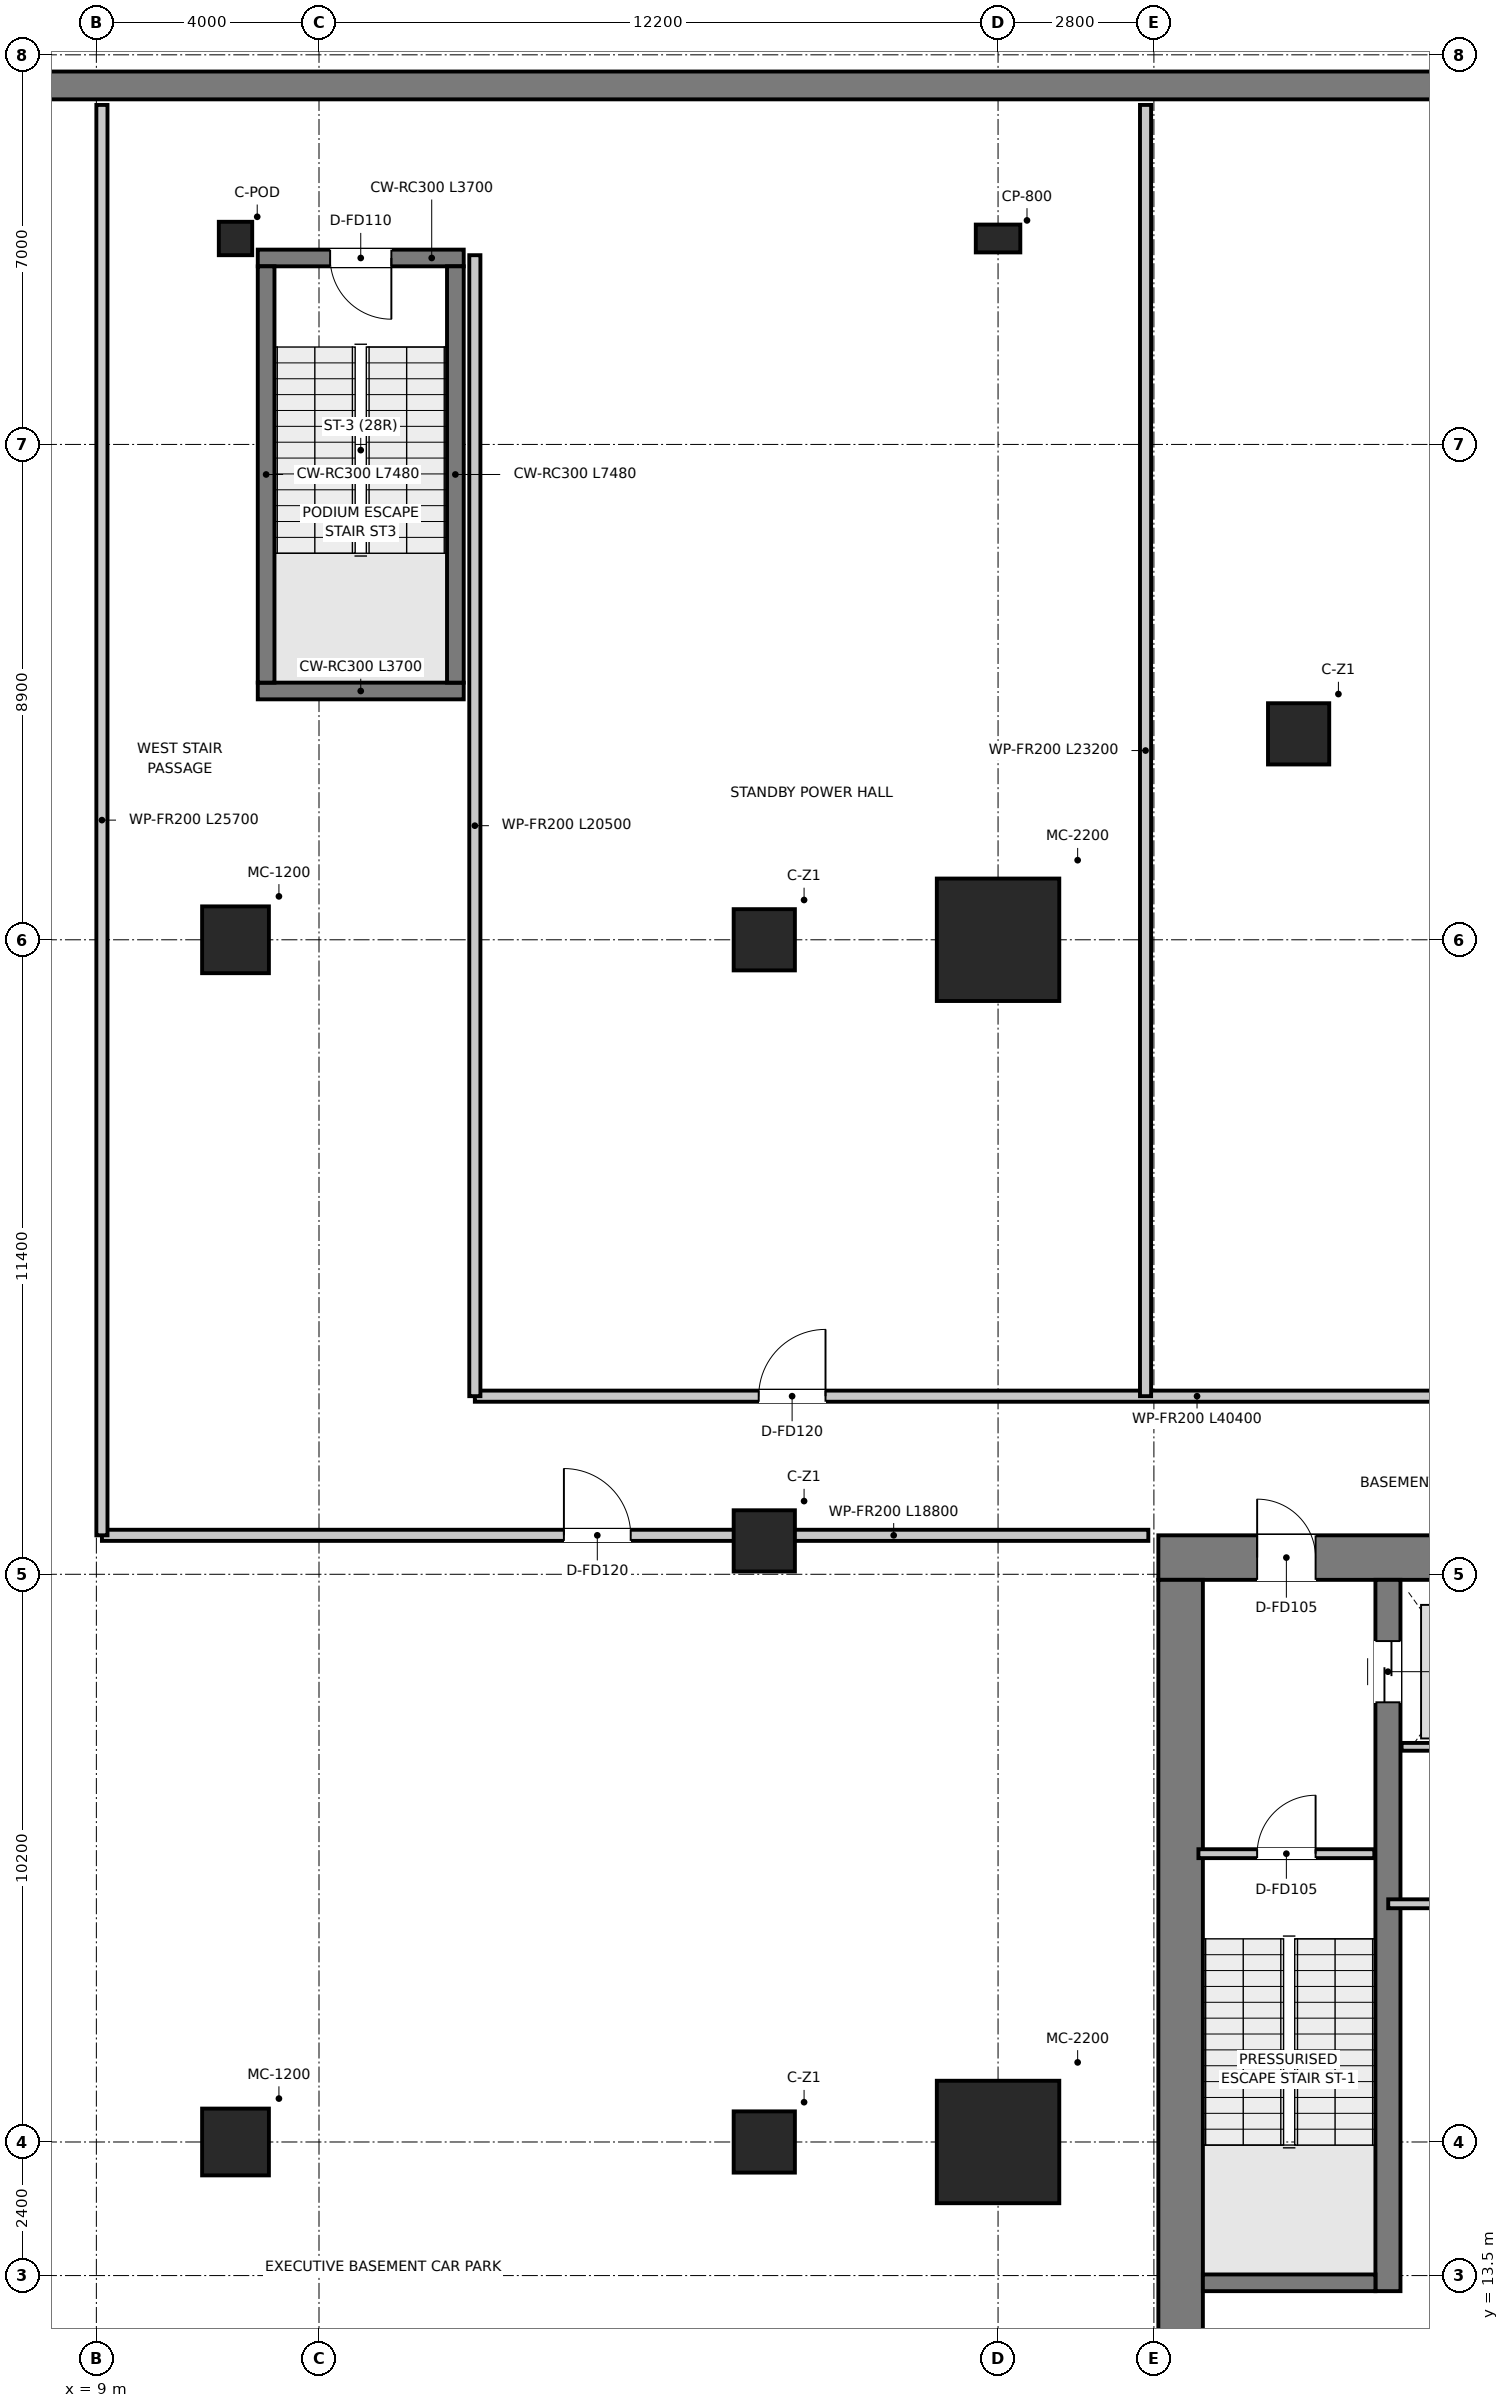
"""IFC4 building model, lengths in metres.
Left out: names, types, materials, properties, quantities, classifications, styles, units other than length and angle.
Written with IfcOpenShell. Run it as: python <this file> out.ifc"""

import sys

from ifc_helpers import new_model, si_unit, direction, frame, frame_2d, origin, origin_2d, place, context, subcontext, project, spatial, rectangle, extrude, source, transform, mapped, element, fill, save


model = new_model("IFC4")
c1 = context("Model", 3, precision=1e-05, world=origin(), true_north=direction((0.0, 1.0)))
c2 = subcontext(c1, "Body", "Model", "MODEL_VIEW")
j1 = project(units=[si_unit("LENGTHUNIT", "METRE"), si_unit("PLANEANGLEUNIT", "RADIAN")], contexts=[c1])
p1 = place(None, origin())
s1 = spatial("IfcSite", under=j1, at=p1, CompositionType="ELEMENT")
p2 = place(p1, origin())
s2 = spatial("IfcBuilding", under=s1, at=p2, CompositionType="ELEMENT")
p3 = place(p2, frame((0.0, 0.0, -4.8)))
s3 = spatial("IfcBuildingStorey", under=s2, at=p3, CompositionType="ELEMENT", Elevation=-4.8)
p4 = place(p3, frame((28.08, 26.4, 0.0), z_axis=(0.0, 0.0, 1.0), x_axis=(1.0, 0.0, 0.0)))
e1 = element("IfcWall", 1, at=p4, inside=s3, PredefinedType="SHEAR", context=c2, shape_type="SweptSolid", body=[
    extrude(rectangle(XDim=15.84, YDim=0.8, at=frame_2d((7.92, 0.0))), origin(), (0.0, 0.0, 1.0), 4.8),
])
p5 = place(p4, frame((7.22, 0.0, 0.0)))
e2 = element("IfcOpeningElement", 2, at=p5, cuts=e1, PredefinedType="OPENING", context=c2, shape_type="SweptSolid", body=[
    extrude(rectangle(XDim=1.4, YDim=2.2, at=frame_2d((0.7, 1.1))), frame((0.0, 0.41, 0.0), z_axis=(0.0, -1.0, 0.0), x_axis=(1.0, 0.0, 0.0)), (0.0, 0.0, 1.0), 0.82),
])
p6 = place(p4, frame((1.775, 0.0, 0.0)))
e3 = element("IfcOpeningElement", 3, at=p6, cuts=e1, PredefinedType="OPENING", context=c2, shape_type="SweptSolid", body=[
    extrude(rectangle(XDim=1.05, YDim=2.1, at=frame_2d((0.525, 1.05))), frame((0.0, 0.41, 0.0), z_axis=(0.0, -1.0, 0.0), x_axis=(1.0, 0.0, 0.0)), (0.0, 0.0, 1.0), 0.82),
])
p7 = place(p4, frame((13.015, 0.0, 0.0)))
e4 = element("IfcOpeningElement", 4, at=p7, cuts=e1, PredefinedType="OPENING", context=c2, shape_type="SweptSolid", body=[
    extrude(rectangle(XDim=1.05, YDim=2.1, at=frame_2d((0.525, 1.05))), frame((0.0, 0.41, 0.0), z_axis=(0.0, -1.0, 0.0), x_axis=(1.0, 0.0, 0.0)), (0.0, 0.0, 1.0), 0.82),
])
p8 = place(p3, frame((28.48, 11.3, 0.0), z_axis=(0.0, 0.0, 1.0), x_axis=(0.0, 1.0, 0.0)))
e5 = element("IfcWall", 5, at=p8, inside=s3, PredefinedType="SHEAR", context=c2, shape_type="SweptSolid", body=[
    extrude(rectangle(XDim=14.7, YDim=0.8, at=frame_2d((7.35, 0.0))), origin(), (0.0, 0.0, 1.0), 4.8),
])
p9 = place(p3, frame((32.205, 13.22, 0.0), z_axis=(0.0, 0.0, 1.0), x_axis=(0.0, 1.0, 0.0)))
e6 = element("IfcWall", 6, at=p9, inside=s3, PredefinedType="SHEAR", context=c2, shape_type="SweptSolid", body=[
    extrude(rectangle(XDim=12.78, YDim=0.45, at=frame_2d((6.39, 0.0))), origin(), (0.0, 0.0, 1.0), 4.8),
])
p10 = place(p9, frame((10.58, 0.0, 0.0)))
e7 = element("IfcOpeningElement", 7, at=p10, cuts=e6, PredefinedType="OPENING", context=c2, shape_type="SweptSolid", body=[
    extrude(rectangle(XDim=1.1, YDim=2.15, at=frame_2d((0.55, 1.075))), frame((0.0, 0.235, 0.0), z_axis=(0.0, -1.0, 0.0), x_axis=(1.0, 0.0, 0.0)), (0.0, 0.0, 1.0), 0.47),
])
p11 = place(p3, frame((28.88, 13.37, 0.0), z_axis=(0.0, 0.0, 1.0), x_axis=(1.0, 0.0, 0.0)))
e8 = element("IfcWall", 8, at=p11, inside=s3, PredefinedType="SHEAR", context=c2, shape_type="SweptSolid", body=[
    extrude(rectangle(XDim=3.1, YDim=0.3, at=frame_2d((1.55, 0.0))), origin(), (0.0, 0.0, 1.0), 4.8),
])
p12 = place(p3, frame((11.9, 41.97, 0.0), z_axis=(0.0, 0.0, 1.0), x_axis=(1.0, 0.0, 0.0)))
e9 = element("IfcWall", 9, at=p12, inside=s3, PredefinedType="SHEAR", context=c2, shape_type="SweptSolid", body=[
    extrude(rectangle(XDim=3.7, YDim=0.3, at=frame_2d((1.85, 0.0))), origin(), (0.0, 0.0, 1.0), 4.8),
])
p13 = place(p3, frame((15.6, 49.75, 0.0), z_axis=(0.0, 0.0, 1.0), x_axis=(-1.0, 0.0, 0.0)))
e10 = element("IfcWall", 10, at=p13, inside=s3, PredefinedType="SHEAR", context=c2, shape_type="SweptSolid", body=[
    extrude(rectangle(XDim=3.7, YDim=0.3, at=frame_2d((1.85, 0.0))), origin(), (0.0, 0.0, 1.0), 4.8),
])
p14 = place(p13, frame((1.3, 0.0, 0.0)))
e11 = element("IfcOpeningElement", 11, at=p14, cuts=e10, PredefinedType="OPENING", context=c2, shape_type="SweptSolid", body=[
    extrude(rectangle(XDim=1.1, YDim=2.15, at=frame_2d((0.55, 1.075))), frame((0.0, 0.16, 0.0), z_axis=(0.0, -1.0, 0.0), x_axis=(1.0, 0.0, 0.0)), (0.0, 0.0, 1.0), 0.32),
])
for number, where, z_axis, x_axis in (
    (12, (12.05, 42.12, 0.0), (0.0, 0.0, 1.0), (0.0, 1.0, 0.0)),
    (13, (15.45, 42.12, 0.0), (0.0, 0.0, 1.0), (0.0, 1.0, 0.0)),
):
    element("IfcWall", number, at=place(p3, frame(where, z_axis=z_axis, x_axis=x_axis)), inside=s3, PredefinedType="SHEAR", context=c2, shape_type="SweptSolid", body=[
        extrude(rectangle(XDim=7.48, YDim=0.3, at=frame_2d((3.74, 0.0))), origin(), (0.0, 0.0, 1.0), 4.8),
    ])
p15 = place(p3, frame((0.0, 52.85, 0.0), z_axis=(0.0, 0.0, 1.0), x_axis=(1.0, 0.0, 0.0)))
e14 = element("IfcWall", 14, at=p15, inside=s3, PredefinedType="SOLIDWALL", context=c2, shape_type="SweptSolid", body=[
    extrude(rectangle(XDim=72.0, YDim=0.5, at=frame_2d((36.0, 0.0))), origin(), (0.0, 0.0, 1.0), 4.8),
])
m1 = source(origin(), c2, "Body", "SweptSolid", [
    extrude(rectangle(XDim=2.2, YDim=2.2, at=origin_2d()), origin(), (0.0, 0.0, 1.0), 4.8),
])
for number, where, z_axis, x_axis in (
    (15, (25.2, 15.9, 0.0), (0.0, 0.0, 1.0), (1.0, 0.0, 0.0)),
    (16, (25.2, 37.5, 0.0), (0.0, 0.0, 1.0), (1.0, 0.0, 0.0)),
):
    element("IfcColumn", number, at=place(p3, frame(where, z_axis=z_axis, x_axis=x_axis)), inside=s3, PredefinedType="USERDEFINED", context=c2, shape_type="MappedRepresentation", body=[
        mapped(m1, transform((0.0, 0.0, 0.0), x_axis=(1.0, 0.0, 0.0), y_axis=(0.0, 1.0, 0.0), z_axis=(0.0, 0.0, 1.0), scale=1.0)),
    ])
m2 = source(origin(), c2, "Body", "SweptSolid", [
    extrude(rectangle(XDim=1.1, YDim=1.1, at=origin_2d()), origin(), (0.0, 0.0, 1.0), 4.8),
])
for number, where, z_axis, x_axis in (
    (17, (21.0, 15.9, 0.0), (0.0, 0.0, 1.0), (1.0, 0.0, 0.0)),
    (18, (21.0, 26.7, 0.0), (0.0, 0.0, 1.0), (1.0, 0.0, 0.0)),
    (19, (21.0, 37.5, 0.0), (0.0, 0.0, 1.0), (1.0, 0.0, 0.0)),
    (20, (30.6, 41.2, 0.0), (0.0, 0.0, 1.0), (1.0, 0.0, 0.0)),
):
    element("IfcColumn", number, at=place(p3, frame(where, z_axis=z_axis, x_axis=x_axis)), inside=s3, PredefinedType="COLUMN", context=c2, shape_type="MappedRepresentation", body=[
        mapped(m2, transform((0.0, 0.0, 0.0), x_axis=(1.0, 0.0, 0.0), y_axis=(0.0, 1.0, 0.0), z_axis=(0.0, 0.0, 1.0), scale=1.0)),
    ])
m3 = source(origin(), c2, "Body", "SweptSolid", [
    extrude(rectangle(XDim=1.2, YDim=1.2, at=origin_2d()), origin(), (0.0, 0.0, 1.0), 4.8),
])
for number, where, z_axis, x_axis in (
    (21, (11.5, 15.9, 0.0), (0.0, 0.0, 1.0), (1.0, 0.0, 0.0)),
    (22, (11.5, 37.5, 0.0), (0.0, 0.0, 1.0), (1.0, 0.0, 0.0)),
):
    element("IfcColumn", number, at=place(p3, frame(where, z_axis=z_axis, x_axis=x_axis)), inside=s3, PredefinedType="USERDEFINED", context=c2, shape_type="MappedRepresentation", body=[
        mapped(m3, transform((0.0, 0.0, 0.0), x_axis=(1.0, 0.0, 0.0), y_axis=(0.0, 1.0, 0.0), z_axis=(0.0, 0.0, 1.0), scale=1.0)),
    ])
m4 = source(origin(), c2, "Body", "SweptSolid", [
    extrude(rectangle(XDim=0.6, YDim=0.6, at=origin_2d()), origin(), (0.0, 0.0, 1.0), 4.8),
])
p16 = place(p3, frame((11.5, 50.1, 0.0), z_axis=(0.0, 0.0, 1.0), x_axis=(1.0, 0.0, 0.0)))
e23 = element("IfcColumn", 23, at=p16, inside=s3, PredefinedType="COLUMN", context=c2, shape_type="MappedRepresentation", body=[
    mapped(m4, transform((0.0, 0.0, 0.0), x_axis=(1.0, 0.0, 0.0), y_axis=(0.0, 1.0, 0.0), z_axis=(0.0, 0.0, 1.0), scale=1.0)),
])
m5 = source(origin(), c2, "Body", "SweptSolid", [
    extrude(rectangle(XDim=0.8, YDim=0.5, at=origin_2d()), origin(), (0.0, 0.0, 1.0), 4.8),
])
p17 = place(p3, frame((25.2, 50.1, 0.0), z_axis=(0.0, 0.0, 1.0), x_axis=(1.0, 0.0, 0.0)))
e24 = element("IfcColumn", 24, at=p17, inside=s3, PredefinedType="PILASTER", context=c2, shape_type="MappedRepresentation", body=[
    mapped(m5, transform((0.0, 0.0, 0.0), x_axis=(1.0, 0.0, 0.0), y_axis=(0.0, 1.0, 0.0), z_axis=(0.0, 0.0, 1.0), scale=1.0)),
])
p18 = place(p3, frame((28.8, 21.08, 0.0), z_axis=(0.0, 0.0, 1.0), x_axis=(1.0, 0.0, 0.0)))
e25 = element("IfcWall", 25, at=p18, inside=s3, PredefinedType="PARTITIONING", context=c2, shape_type="SweptSolid", body=[
    extrude(rectangle(XDim=3.16, YDim=0.16, at=frame_2d((1.58, 0.0))), origin(), (0.0, 0.0, 1.0), 4.45),
])
p19 = place(p18, frame((1.055, 0.0, 0.0)))
e26 = element("IfcOpeningElement", 26, at=p19, cuts=e25, PredefinedType="OPENING", context=c2, shape_type="SweptSolid", body=[
    extrude(rectangle(XDim=1.05, YDim=2.1, at=frame_2d((0.525, 1.05))), frame((0.0, 0.09, 0.0), z_axis=(0.0, -1.0, 0.0), x_axis=(1.0, 0.0, 0.0)), (0.0, 0.0, 1.0), 0.18),
])
p20 = place(p3, frame((32.45, 23.0, 0.0), z_axis=(0.0, 0.0, 1.0), x_axis=(1.0, 0.0, 0.0)))
e27 = element("IfcWall", 27, at=p20, inside=s3, PredefinedType="PARTITIONING", context=c2, shape_type="SweptSolid", body=[
    extrude(rectangle(XDim=2.27, YDim=0.14, at=frame_2d((1.135, 0.0))), origin(), (0.0, 0.0, 1.0), 3.25),
])
p21 = place(p3, frame((32.21, 20.18, 0.0), z_axis=(0.0, 0.0, 1.0), x_axis=(1.0, 0.0, 0.0)))
e28 = element("IfcWall", 28, at=p21, inside=s3, PredefinedType="PARTITIONING", context=c2, shape_type="SweptSolid", body=[
    extrude(rectangle(XDim=7.58, YDim=0.16, at=frame_2d((3.79, 0.0))), origin(), (0.0, 0.0, 1.0), 4.45),
])
p22 = place(p21, frame((3.315, 0.0, 0.0)))
e29 = element("IfcOpeningElement", 29, at=p22, cuts=e28, PredefinedType="OPENING", context=c2, shape_type="SweptSolid", body=[
    extrude(rectangle(XDim=0.95, YDim=2.1, at=frame_2d((0.475, 1.05))), frame((0.0, 0.09, 0.0), z_axis=(0.0, -1.0, 0.0), x_axis=(1.0, 0.0, 0.0)), (0.0, 0.0, 1.0), 0.18),
])
p23 = place(p3, frame((15.8, 29.3, 0.0), z_axis=(0.0, 0.0, 1.0), x_axis=(1.0, 0.0, 0.0)))
e30 = element("IfcWall", 30, at=p23, inside=s3, PredefinedType="PARTITIONING", context=c2, shape_type="SweptSolid", body=[
    extrude(rectangle(XDim=40.4, YDim=0.2, at=frame_2d((20.2, 0.0))), origin(), (0.0, 0.0, 1.0), 3.65),
])
p24 = place(p23, frame((5.1, 0.0, 0.0)))
e31 = element("IfcOpeningElement", 31, at=p24, cuts=e30, PredefinedType="OPENING", context=c2, shape_type="SweptSolid", body=[
    extrude(rectangle(XDim=1.2, YDim=2.15, at=frame_2d((0.6, 1.075))), frame((0.0, 0.11, 0.0), z_axis=(0.0, -1.0, 0.0), x_axis=(1.0, 0.0, 0.0)), (0.0, 0.0, 1.0), 0.22),
])
p25 = place(p23, frame((19.65, 0.0, 0.0)))
e32 = element("IfcOpeningElement", 32, at=p25, cuts=e30, PredefinedType="OPENING", context=c2, shape_type="SweptSolid", body=[
    extrude(rectangle(XDim=1.1, YDim=2.15, at=frame_2d((0.55, 1.075))), frame((0.0, 0.11, 0.0), z_axis=(0.0, -1.0, 0.0), x_axis=(1.0, 0.0, 0.0)), (0.0, 0.0, 1.0), 0.22),
])
p26 = place(p23, frame((33.6, 0.0, 0.0)))
e33 = element("IfcOpeningElement", 33, at=p26, cuts=e30, PredefinedType="OPENING", context=c2, shape_type="SweptSolid", body=[
    extrude(rectangle(XDim=1.2, YDim=2.15, at=frame_2d((0.6, 1.075))), frame((0.0, 0.11, 0.0), z_axis=(0.0, -1.0, 0.0), x_axis=(1.0, 0.0, 0.0)), (0.0, 0.0, 1.0), 0.22),
])
p27 = place(p3, frame((9.1, 26.8, 0.0), z_axis=(0.0, 0.0, 1.0), x_axis=(1.0, 0.0, 0.0)))
e34 = element("IfcWall", 34, at=p27, inside=s3, PredefinedType="PARTITIONING", context=c2, shape_type="SweptSolid", body=[
    extrude(rectangle(XDim=18.8, YDim=0.2, at=frame_2d((9.4, 0.0))), origin(), (0.0, 0.0, 1.0), 2.65),
])
p28 = place(p27, frame((8.3, 0.0, 0.0)))
e35 = element("IfcOpeningElement", 35, at=p28, cuts=e34, PredefinedType="OPENING", context=c2, shape_type="SweptSolid", body=[
    extrude(rectangle(XDim=1.2, YDim=2.15, at=frame_2d((0.6, 1.075))), frame((0.0, 0.11, 0.0), z_axis=(0.0, -1.0, 0.0), x_axis=(1.0, 0.0, 0.0)), (0.0, 0.0, 1.0), 0.22),
])
p29 = place(p3, frame((9.1, 26.8, 0.0), z_axis=(0.0, 0.0, 1.0), x_axis=(0.0, 1.0, 0.0)))
e36 = element("IfcWall", 36, at=p29, inside=s3, PredefinedType="PARTITIONING", context=c2, shape_type="SweptSolid", body=[
    extrude(rectangle(XDim=25.7, YDim=0.2, at=frame_2d((12.85, 0.0))), origin(), (0.0, 0.0, 1.0), 3.45),
])
p30 = place(p3, frame((15.8, 29.3, 0.0), z_axis=(0.0, 0.0, 1.0), x_axis=(0.0, 1.0, 0.0)))
e37 = element("IfcWall", 37, at=p30, inside=s3, PredefinedType="PARTITIONING", context=c2, shape_type="SweptSolid", body=[
    extrude(rectangle(XDim=20.5, YDim=0.2, at=frame_2d((10.25, 0.0))), origin(), (0.0, 0.0, 1.0), 3.45),
])
p31 = place(p3, frame((27.85, 29.3, 0.0), z_axis=(0.0, 0.0, 1.0), x_axis=(0.0, 1.0, 0.0)))
e38 = element("IfcWall", 38, at=p31, inside=s3, PredefinedType="PARTITIONING", context=c2, shape_type="SweptSolid", body=[
    extrude(rectangle(XDim=23.2, YDim=0.2, at=frame_2d((11.6, 0.0))), origin(), (0.0, 0.0, 1.0), 3.65),
])
p32 = place(p19, origin())
e39 = element("IfcDoor", 39, at=p32, inside=s3, OperationType="SINGLE_SWING_RIGHT", PredefinedType="DOOR", context=c2, shape_type="SweptSolid", body=[
    extrude(rectangle(XDim=1.05, YDim=2.1, at=frame_2d((0.525, 1.05))), frame((0.0, 0.025, 0.0), z_axis=(0.0, -1.0, 0.0), x_axis=(1.0, 0.0, 0.0)), (0.0, 0.0, 1.0), 0.05),
])
fill(e26, e39)
p33 = place(p6, origin())
e40 = element("IfcDoor", 40, at=p33, inside=s3, OperationType="SINGLE_SWING_LEFT", PredefinedType="DOOR", context=c2, shape_type="SweptSolid", body=[
    extrude(rectangle(XDim=1.05, YDim=2.1, at=frame_2d((0.525, 1.05))), frame((0.0, 0.025, 0.0), z_axis=(0.0, -1.0, 0.0), x_axis=(1.0, 0.0, 0.0)), (0.0, 0.0, 1.0), 0.05),
])
fill(e3, e40)
p34 = place(p10, origin())
e41 = element("IfcDoor", 41, at=p34, inside=s3, OperationType="DOUBLE_DOOR_SLIDING", PredefinedType="DOOR", context=c2, shape_type="SweptSolid", body=[
    extrude(rectangle(XDim=1.1, YDim=2.15, at=frame_2d((0.55, 1.075))), frame((0.0, 0.025, 0.0), z_axis=(0.0, -1.0, 0.0), x_axis=(1.0, 0.0, 0.0)), (0.0, 0.0, 1.0), 0.05),
])
fill(e7, e41)
p35 = place(p14, origin())
e42 = element("IfcDoor", 42, at=p35, inside=s3, OperationType="SINGLE_SWING_LEFT", PredefinedType="DOOR", context=c2, shape_type="SweptSolid", body=[
    extrude(rectangle(XDim=1.1, YDim=2.15, at=frame_2d((0.55, 1.075))), frame((0.0, 0.025, 0.0), z_axis=(0.0, -1.0, 0.0), x_axis=(1.0, 0.0, 0.0)), (0.0, 0.0, 1.0), 0.05),
])
fill(e11, e42)
p36 = place(p28, origin())
e43 = element("IfcDoor", 43, at=p36, inside=s3, OperationType="SINGLE_SWING_LEFT", PredefinedType="DOOR", context=c2, shape_type="SweptSolid", body=[
    extrude(rectangle(XDim=1.2, YDim=2.15, at=frame_2d((0.6, 1.075))), frame((0.0, 0.025, 0.0), z_axis=(0.0, -1.0, 0.0), x_axis=(1.0, 0.0, 0.0)), (0.0, 0.0, 1.0), 0.05),
])
fill(e35, e43)
p37 = place(p24, origin())
e44 = element("IfcDoor", 44, at=p37, inside=s3, OperationType="SINGLE_SWING_RIGHT", PredefinedType="DOOR", context=c2, shape_type="SweptSolid", body=[
    extrude(rectangle(XDim=1.2, YDim=2.15, at=frame_2d((0.6, 1.075))), frame((0.0, 0.025, 0.0), z_axis=(0.0, -1.0, 0.0), x_axis=(1.0, 0.0, 0.0)), (0.0, 0.0, 1.0), 0.05),
])
fill(e31, e44)
save(model, sys.argv[1])
